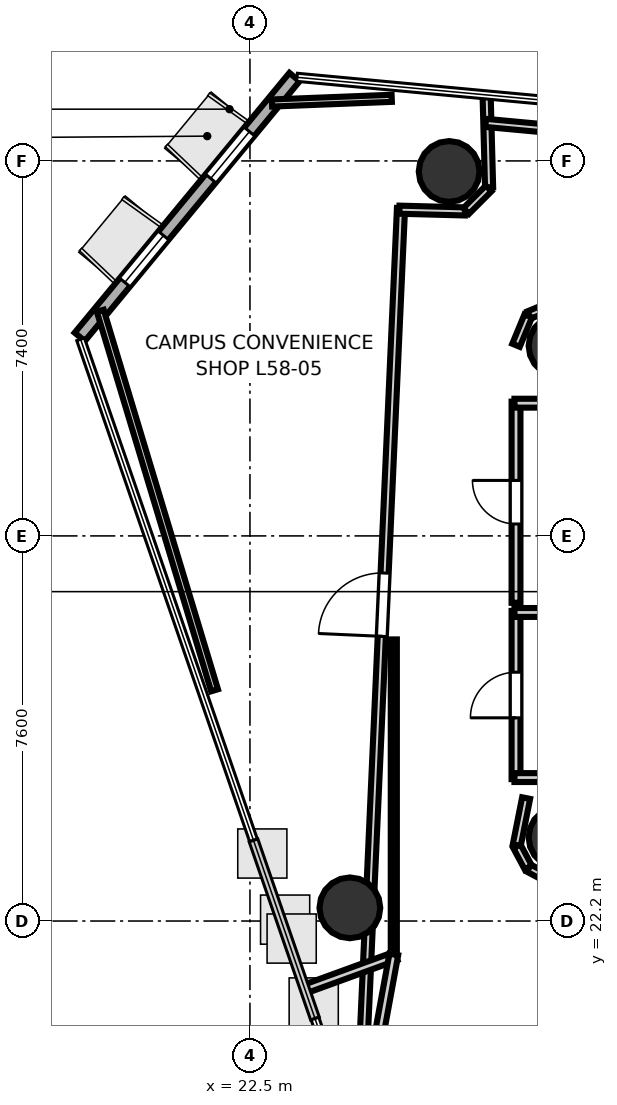
"""IFC4 building model, lengths in metres.
Left out: names, types, materials, properties, quantities, classifications, styles, units other than length and angle.
Written with IfcOpenShell. Run it as: python <this file> out.ifc"""

import sys

from ifc_helpers import new_model, si_unit, direction, frame, frame_2d, origin, origin_2d, place, context, subcontext, project, spatial, rectangle, hollow_circle, extrude, element, fill, save


model = new_model("IFC4")
c1 = context("Model", 3, precision=1e-05, world=origin(), true_north=direction((0.0, 1.0)))
c2 = subcontext(c1, "Body", "Model", "MODEL_VIEW")
j1 = project(units=[si_unit("LENGTHUNIT", "METRE"), si_unit("PLANEANGLEUNIT", "RADIAN")], contexts=[c1])
p1 = place(None, origin())
s1 = spatial("IfcSite", under=j1, at=p1, CompositionType="ELEMENT")
p2 = place(p1, origin())
s2 = spatial("IfcBuilding", under=s1, at=p2, CompositionType="ELEMENT")
p3 = place(p2, frame((0.0, 0.0, 226.2)))
s3 = spatial("IfcBuildingStorey", under=s2, at=p3, CompositionType="ELEMENT", Elevation=226.2)
for number, where, z_axis, x_axis in (
    (1, (28.6, 33.55, 0.0), (0.0, 0.0, 1.0), (1.0, 0.0, 0.0)),
    (2, (28.6, 23.85, 0.0), (0.0, 0.0, 1.0), (1.0, 0.0, 0.0)),
    (3, (26.431, 36.992, 0.0), (0.0, 0.0, 1.0), (1.0, 0.0, 0.0)),
    (4, (24.472, 22.46, 0.0), (0.0, 0.0, 1.0), (1.0, 0.0, 0.0)),
):
    element("IfcColumn", number, at=place(p3, frame(where, z_axis=z_axis, x_axis=x_axis)), inside=s3, PredefinedType="COLUMN", context=c2, shape_type="SweptSolid", body=[
        extrude(hollow_circle(Radius=0.6, WallThickness=0.03, at=origin_2d()), origin(), (0.0, 0.0, 1.0), 3.7),
    ])
p4 = place(p3, frame((23.379, 38.855, 0.0), z_axis=(0.0, 0.0, 1.0), x_axis=(-0.637074894776, -0.770801906099, 0.0)))
e5 = element("IfcWall", 5, at=p4, inside=s3, PredefinedType="SOLIDWALL", context=c2, shape_type="SweptSolid", body=[
    extrude(rectangle(XDim=6.653, YDim=0.26, at=frame_2d((3.326, 0.0))), origin(), (0.0, 0.0, 1.0), 3.4),
])
p5 = place(p4, frame((1.396, 0.0, 0.9)))
e6 = element("IfcOpeningElement", 6, at=p5, cuts=e5, PredefinedType="OPENING", context=c2, shape_type="SweptSolid", body=[
    extrude(rectangle(XDim=1.2, YDim=2.0, at=frame_2d((0.6, 1.0))), frame((0.0, 0.14, 0.0), z_axis=(0.0, -1.0, 0.0), x_axis=(1.0, 0.0, 0.0)), (0.0, 0.0, 1.0), 0.28),
])
p6 = place(p4, frame((4.057, 0.0, 0.9)))
e7 = element("IfcOpeningElement", 7, at=p6, cuts=e5, PredefinedType="OPENING", context=c2, shape_type="SweptSolid", body=[
    extrude(rectangle(XDim=1.2, YDim=2.0, at=frame_2d((0.6, 1.0))), frame((0.0, 0.14, 0.0), z_axis=(0.0, -1.0, 0.0), x_axis=(1.0, 0.0, 0.0)), (0.0, 0.0, 1.0), 0.28),
])
p7 = place(p3, frame((27.751, 25.0, 0.0), z_axis=(0.0, 0.0, 1.0), x_axis=(0.0, 1.0, 0.0)))
e8 = element("IfcWall", 8, at=p7, inside=s3, PredefinedType="PLUMBINGWALL", context=c2, shape_type="SweptSolid", body=[
    extrude(rectangle(XDim=3.32, YDim=0.175, at=frame_2d((1.66, 0.0))), origin(), (0.0, 0.0, 1.0), 2.72),
])
p8 = place(p7, frame((1.21, 0.0, 0.0)))
e9 = element("IfcOpeningElement", 9, at=p8, cuts=e8, PredefinedType="OPENING", context=c2, shape_type="SweptSolid", body=[
    extrude(rectangle(XDim=0.9, YDim=2.1, at=frame_2d((0.45, 1.05))), frame((0.0, 0.097, 0.0), z_axis=(0.0, -1.0, 0.0), x_axis=(1.0, 0.0, 0.0)), (0.0, 0.0, 1.0), 0.195),
])
for number, where, z_axis, x_axis in (
    (10, (27.72, 28.289, 0.0), (0.0, 0.0, 1.0), (1.0, 0.0, 0.0)),
    (11, (29.22, 25.031, 0.0), (0.0, 0.0, 1.0), (-1.0, 0.0, 0.0)),
):
    element("IfcWall", number, at=place(p3, frame(where, z_axis=z_axis, x_axis=x_axis)), inside=s3, PredefinedType="PLUMBINGWALL", context=c2, shape_type="SweptSolid", body=[
        extrude(rectangle(XDim=1.5, YDim=0.175, at=frame_2d((0.75, 0.0))), origin(), (0.0, 0.0, 1.0), 2.72),
    ])
p9 = place(p3, frame((27.751, 28.48, 0.0), z_axis=(0.0, 0.0, 1.0), x_axis=(0.0, 1.0, 0.0)))
e12 = element("IfcWall", 12, at=p9, inside=s3, PredefinedType="PLUMBINGWALL", context=c2, shape_type="SweptSolid", body=[
    extrude(rectangle(XDim=3.97, YDim=0.175, at=frame_2d((1.985, 0.0))), origin(), (0.0, 0.0, 1.0), 2.72),
])
p10 = place(p9, frame((1.555, 0.0, 0.0)))
e13 = element("IfcOpeningElement", 13, at=p10, cuts=e12, PredefinedType="OPENING", context=c2, shape_type="SweptSolid", body=[
    extrude(rectangle(XDim=0.86, YDim=2.05, at=frame_2d((0.43, 1.025))), frame((0.0, 0.097, 0.0), z_axis=(0.0, -1.0, 0.0), x_axis=(1.0, 0.0, 0.0)), (0.0, 0.0, 1.0), 0.195),
])
p11 = place(p3, frame((27.72, 32.419, 0.0), z_axis=(0.0, 0.0, 1.0), x_axis=(1.0, 0.0, 0.0)))
e14 = element("IfcWall", 14, at=p11, inside=s3, PredefinedType="PLUMBINGWALL", context=c2, shape_type="SweptSolid", body=[
    extrude(rectangle(XDim=1.5, YDim=0.175, at=frame_2d((0.75, 0.0))), origin(), (0.0, 0.0, 1.0), 2.72),
])
p12 = place(p3, frame((27.219, 36.679, 0.0), z_axis=(0.0, 0.0, 1.0), x_axis=(-0.026877703582, 0.999638729267, 0.0)))
e15 = element("IfcWall", 15, at=p12, inside=s3, PredefinedType="PARTITIONING", context=c2, shape_type="SweptSolid", body=[
    extrude(rectangle(XDim=1.844, YDim=0.16, at=frame_2d((0.922, 0.0))), origin(), (0.0, 0.0, 1.0), 2.72),
])
p13 = place(p3, frame((27.151, 37.951, 0.0), z_axis=(0.0, 0.0, 1.0), x_axis=(0.995705004973, -0.092582628349, 0.0)))
e16 = element("IfcWall", 16, at=p13, inside=s3, PredefinedType="PARTITIONING", context=c2, shape_type="SweptSolid", body=[
    extrude(rectangle(XDim=11.882, YDim=0.16, at=frame_2d((5.941, 0.0))), origin(), (0.0, 0.0, 1.0), 2.72),
])
p14 = place(p3, frame((28.588, 34.399, 0.0), z_axis=(0.0, 0.0, 1.0), x_axis=(-0.923846138666, -0.382764042293, 0.0)))
e17 = element("IfcWall", 17, at=p14, inside=s3, PredefinedType="PARTITIONING", context=c2, shape_type="SweptSolid", body=[
    extrude(rectangle(XDim=0.628, YDim=0.16, at=frame_2d((0.314, 0.0))), origin(), (0.0, 0.0, 1.0), 2.72),
])
p15 = place(p3, frame((27.991, 34.142, 0.0), z_axis=(0.0, 0.0, 1.0), x_axis=(-0.382569489008, -0.923926721164, 0.0)))
e18 = element("IfcWall", 18, at=p15, inside=s3, PredefinedType="PARTITIONING", context=c2, shape_type="SweptSolid", body=[
    extrude(rectangle(XDim=0.627, YDim=0.16, at=frame_2d((0.313, 0.0))), origin(), (0.0, 0.0, 1.0), 2.72),
])
p16 = place(p3, frame((27.95, 24.626, 0.0), z_axis=(0.0, 0.0, 1.0), x_axis=(-0.195125950178, -0.980778192848, 0.0)))
e19 = element("IfcWall", 19, at=p16, inside=s3, PredefinedType="PARTITIONING", context=c2, shape_type="SweptSolid", body=[
    extrude(rectangle(XDim=0.948, YDim=0.16, at=frame_2d((0.474, 0.0))), origin(), (0.0, 0.0, 1.0), 2.72),
])
for number, where, z_axis, x_axis in (
    (20, (27.768, 23.675, 0.0), (0.0, 0.0, 1.0), (0.472, -0.882, 0.0)),
    (21, (28.006, 23.243, 0.0), (0.0, 0.0, 1.0), (0.882, -0.472, 0.0)),
):
    element("IfcWall", number, at=place(p3, frame(where, z_axis=z_axis, x_axis=x_axis)), inside=s3, PredefinedType="PARTITIONING", context=c2, shape_type="SweptSolid", body=[
        extrude(rectangle(XDim=0.476, YDim=0.16, at=frame_2d((0.238, 0.0))), origin(), (0.0, 0.0, 1.0), 2.72),
    ])
p17 = place(p3, frame((24.65, 17.763, 0.0), z_axis=(0.0, 0.0, 1.0), x_axis=(0.044837312533, 0.998994301988, 0.0)))
e22 = element("IfcWall", 22, at=p17, inside=s3, PredefinedType="PARTITIONING", context=c2, shape_type="SweptSolid", body=[
    extrude(rectangle(XDim=18.524, YDim=0.16, at=frame_2d((9.262, 0.0))), origin(), (0.0, 0.0, 1.0), 2.72),
])
p18 = place(p17, frame((10.065, 0.0, 0.0)))
e23 = element("IfcOpeningElement", 23, at=p18, cuts=e22, PredefinedType="OPENING", context=c2, shape_type="SweptSolid", body=[
    extrude(rectangle(XDim=1.25, YDim=2.2, at=frame_2d((0.625, 1.1))), frame((0.0, 0.09, 0.0), z_axis=(0.0, -1.0, 0.0), x_axis=(1.0, 0.0, 0.0)), (0.0, 0.0, 1.0), 0.18),
])
p19 = place(p3, frame((25.449, 36.238, 0.0), z_axis=(0.0, 0.0, 1.0), x_axis=(0.999651698073, -0.026390955635, 0.0)))
e24 = element("IfcWall", 24, at=p19, inside=s3, PredefinedType="PARTITIONING", context=c2, shape_type="SweptSolid", body=[
    extrude(rectangle(XDim=1.295, YDim=0.16, at=frame_2d((0.647, 0.0))), origin(), (0.0, 0.0, 1.0), 2.72),
])
p20 = place(p3, frame((26.767, 36.212, 0.0), z_axis=(0.0, 0.0, 1.0), x_axis=(0.707106781187, 0.707106781187, 0.0)))
e25 = element("IfcWall", 25, at=p20, inside=s3, PredefinedType="PARTITIONING", context=c2, shape_type="SweptSolid", body=[
    extrude(rectangle(XDim=0.628, YDim=0.16, at=frame_2d((0.314, 0.0))), origin(), (0.0, 0.0, 1.0), 2.72),
])
p21 = place(p3, frame((23.564, 20.85, 0.0), z_axis=(0.0, 0.0, 1.0), x_axis=(0.939704898586, 0.341986408463, 0.0)))
e26 = element("IfcWall", 26, at=p21, inside=s3, PredefinedType="PLUMBINGWALL", context=c2, shape_type="SweptSolid", body=[
    extrude(rectangle(XDim=1.933, YDim=0.175, at=frame_2d((0.967, 0.0))), origin(), (0.0, 0.0, 1.0), 2.72),
])
p22 = place(p3, frame((25.339, 21.54, 0.0), z_axis=(0.0, 0.0, 1.0), x_axis=(-0.180437406322, -0.983586469203, 0.0)))
e27 = element("IfcWall", 27, at=p22, inside=s3, PredefinedType="PLUMBINGWALL", context=c2, shape_type="SweptSolid", body=[
    extrude(rectangle(XDim=2.049, YDim=0.175, at=frame_2d((1.024, 0.0))), origin(), (0.0, 0.0, 1.0), 2.72),
])
p23 = place(p3, frame((22.935, 38.343, 0.0), z_axis=(0.0, 0.0, 1.0), x_axis=(0.999238592885, 0.039015823583, 0.0)))
e28 = element("IfcWall", 28, at=p23, inside=s3, PredefinedType="PARTITIONING", context=c2, shape_type="SweptSolid", body=[
    extrude(rectangle(XDim=2.365, YDim=0.14, at=frame_2d((1.183, 0.0))), origin(), (0.0, 0.0, 1.0), 2.72),
])
p24 = place(p3, frame((25.339, 27.757, 0.0), z_axis=(0.0, 0.0, 1.0), x_axis=(0.0, -1.0, 0.0)))
e29 = element("IfcWall", 29, at=p24, inside=s3, PredefinedType="PARTITIONING", context=c2, shape_type="SweptSolid", body=[
    extrude(rectangle(XDim=6.127, YDim=0.12, at=frame_2d((3.064, 0.0))), origin(), (0.0, 0.0, 1.0), 2.72),
])
p25 = place(p3, frame((21.802, 26.753, 0.0), z_axis=(0.0, 0.0, 1.0), x_axis=(-0.288358504088, 0.957522518336, 0.0)))
e30 = element("IfcWall", 30, at=p25, inside=s3, PredefinedType="PARTITIONING", context=c2, shape_type="SweptSolid", body=[
    extrude(rectangle(XDim=7.822, YDim=0.14, at=frame_2d((3.911, 0.0))), origin(), (0.0, 0.0, 1.0), 2.72),
])
p26 = place(p8, origin())
e31 = element("IfcDoor", 31, at=p26, inside=s3, OperationType="SINGLE_SWING_LEFT", PredefinedType="DOOR", context=c2, shape_type="SweptSolid", body=[
    extrude(rectangle(XDim=0.9, YDim=2.1, at=frame_2d((0.45, 1.05))), frame((0.0, 0.025, 0.0), z_axis=(0.0, -1.0, 0.0), x_axis=(1.0, 0.0, 0.0)), (0.0, 0.0, 1.0), 0.05),
])
fill(e9, e31)
p27 = place(p10, origin())
e32 = element("IfcDoor", 32, at=p27, inside=s3, OperationType="SINGLE_SWING_RIGHT", PredefinedType="DOOR", context=c2, shape_type="SweptSolid", body=[
    extrude(rectangle(XDim=0.86, YDim=2.05, at=frame_2d((0.43, 1.025))), frame((0.0, 0.025, 0.0), z_axis=(0.0, -1.0, 0.0), x_axis=(1.0, 0.0, 0.0)), (0.0, 0.0, 1.0), 0.05),
])
fill(e13, e32)
p28 = place(p18, origin())
e33 = element("IfcDoor", 33, at=p28, inside=s3, OperationType="SINGLE_SWING_LEFT", PredefinedType="DOOR", context=c2, shape_type="SweptSolid", body=[
    extrude(rectangle(XDim=1.25, YDim=2.2, at=frame_2d((0.625, 1.1))), frame((0.0, 0.025, 0.0), z_axis=(0.0, -1.0, 0.0), x_axis=(1.0, 0.0, 0.0)), (0.0, 0.0, 1.0), 0.05),
])
fill(e23, e33)
p29 = place(p5, origin())
e34 = element("IfcWindow", 34, at=p29, inside=s3, PartitioningType="SINGLE_PANEL", PredefinedType="WINDOW", context=c2, shape_type="SweptSolid", body=[
    extrude(rectangle(XDim=1.2, YDim=2.0, at=frame_2d((0.6, 1.0))), frame((0.0, 0.03, 0.0), z_axis=(0.0, -1.0, 0.0), x_axis=(1.0, 0.0, 0.0)), (0.0, 0.0, 1.0), 0.06),
])
fill(e6, e34)
p30 = place(p6, origin())
e35 = element("IfcWindow", 35, at=p30, inside=s3, PartitioningType="SINGLE_PANEL", PredefinedType="WINDOW", context=c2, shape_type="SweptSolid", body=[
    extrude(rectangle(XDim=1.2, YDim=2.0, at=frame_2d((0.6, 1.0))), frame((0.0, 0.03, 0.0), z_axis=(0.0, -1.0, 0.0), x_axis=(1.0, 0.0, 0.0)), (0.0, 0.0, 1.0), 0.06),
])
fill(e7, e35)
save(model, sys.argv[1])
